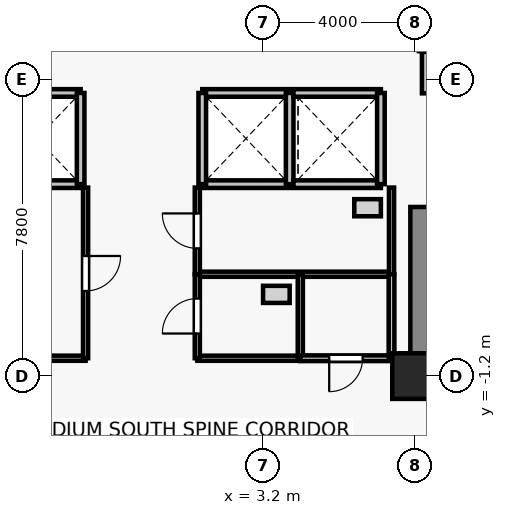
"""IFC4 building model, lengths in metres.
Left out: names, types, materials, properties, quantities, classifications, styles, units other than length and angle.
Written with IfcOpenShell. Run it as: python <this file> out.ifc"""

import sys

from ifc_helpers import new_model, si_unit, direction, frame, frame_2d, origin, origin_2d, place, context, subcontext, project, spatial, rectangle, extrude, source, transform, mapped, element, fill, save


model = new_model("IFC4")
c1 = context("Model", 3, precision=1e-05, world=origin(), true_north=direction((0.0, 1.0)))
c2 = subcontext(c1, "Body", "Model", "MODEL_VIEW")
j1 = project(units=[si_unit("LENGTHUNIT", "METRE"), si_unit("PLANEANGLEUNIT", "RADIAN")], contexts=[c1])
p1 = place(None, origin())
s1 = spatial("IfcSite", under=j1, at=p1, CompositionType="ELEMENT")
p2 = place(p1, origin())
s2 = spatial("IfcBuilding", under=s1, at=p2, CompositionType="ELEMENT")
p3 = place(p2, frame((0.0, 0.0, 13.8)))
s3 = spatial("IfcBuildingStorey", under=s2, at=p3, CompositionType="ELEMENT", Elevation=13.8)
p4 = place(p3, frame((7.2, -1.2, 0.0), z_axis=(0.0, 0.0, 1.0), x_axis=(1.0, 0.0, 0.0)))
e1 = element("IfcColumn", 1, at=p4, inside=s3, PredefinedType="COLUMN", context=c2, shape_type="SweptSolid", body=[
    extrude(rectangle(XDim=1.2, YDim=1.2, at=origin_2d()), origin(), (0.0, 0.0, 1.0), 4.4),
])
p5 = place(p3, frame((7.4, -0.75, 0.0), z_axis=(0.0, 0.0, 1.0), x_axis=(0.0, 1.0, 0.0)))
e2 = element("IfcWall", 2, at=p5, inside=s3, PredefinedType="SHEAR", context=c2, shape_type="SweptSolid", body=[
    extrude(rectangle(XDim=4.0, YDim=0.65, at=frame_2d((2.0, 0.0))), origin(), (0.0, 0.0, 1.0), 4.1),
])
for number, where, z_axis, x_axis in (
    (3, (-1.6, 3.85, 0.0), (0.0, 0.0, 1.0), (-1.0, 0.0, 0.0)),
    (4, (-3.9, 6.25, 0.0), (0.0, 0.0, 1.0), (1.0, 0.0, 0.0)),
):
    element("IfcWall", number, at=place(p3, frame(where, z_axis=z_axis, x_axis=x_axis)), inside=s3, PredefinedType="SOLIDWALL", context=c2, shape_type="SweptSolid", body=[
        extrude(rectangle(XDim=2.3, YDim=0.2, at=frame_2d((1.15, 0.0))), origin(), (0.0, 0.0, 1.0), 4.1),
    ])
p6 = place(p3, frame((-1.6, 6.25, 0.0), z_axis=(0.0, 0.0, 1.0), x_axis=(0.0, -1.0, 0.0)))
e5 = element("IfcWall", 5, at=p6, inside=s3, PredefinedType="SOLIDWALL", context=c2, shape_type="SweptSolid", body=[
    extrude(rectangle(XDim=2.4, YDim=0.2, at=frame_2d((1.2, 0.0))), origin(), (0.0, 0.0, 1.0), 4.1),
])
for number, where, z_axis, x_axis in (
    (6, (3.9, 3.85, 0.0), (0.0, 0.0, 1.0), (-1.0, 0.0, 0.0)),
    (7, (1.6, 6.25, 0.0), (0.0, 0.0, 1.0), (1.0, 0.0, 0.0)),
):
    element("IfcWall", number, at=place(p3, frame(where, z_axis=z_axis, x_axis=x_axis)), inside=s3, PredefinedType="SOLIDWALL", context=c2, shape_type="SweptSolid", body=[
        extrude(rectangle(XDim=2.3, YDim=0.2, at=frame_2d((1.15, 0.0))), origin(), (0.0, 0.0, 1.0), 4.1),
    ])
for number, where, z_axis, x_axis in (
    (8, (1.6, 3.85, 0.0), (0.0, 0.0, 1.0), (0.0, 1.0, 0.0)),
    (9, (3.9, 6.25, 0.0), (0.0, 0.0, 1.0), (0.0, -1.0, 0.0)),
):
    element("IfcWall", number, at=place(p3, frame(where, z_axis=z_axis, x_axis=x_axis)), inside=s3, PredefinedType="SOLIDWALL", context=c2, shape_type="SweptSolid", body=[
        extrude(rectangle(XDim=2.4, YDim=0.2, at=frame_2d((1.2, 0.0))), origin(), (0.0, 0.0, 1.0), 4.1),
    ])
for number, where, z_axis, x_axis in (
    (10, (6.3, 3.85, 0.0), (0.0, 0.0, 1.0), (-1.0, 0.0, 0.0)),
    (11, (4.0, 6.25, 0.0), (0.0, 0.0, 1.0), (1.0, 0.0, 0.0)),
):
    element("IfcWall", number, at=place(p3, frame(where, z_axis=z_axis, x_axis=x_axis)), inside=s3, PredefinedType="SOLIDWALL", context=c2, shape_type="SweptSolid", body=[
        extrude(rectangle(XDim=2.3, YDim=0.2, at=frame_2d((1.15, 0.0))), origin(), (0.0, 0.0, 1.0), 4.1),
    ])
p7 = place(p3, frame((6.3, 6.25, 0.0), z_axis=(0.0, 0.0, 1.0), x_axis=(0.0, -1.0, 0.0)))
e12 = element("IfcWall", 12, at=p7, inside=s3, PredefinedType="SOLIDWALL", context=c2, shape_type="SweptSolid", body=[
    extrude(rectangle(XDim=2.4, YDim=0.2, at=frame_2d((1.2, 0.0))), origin(), (0.0, 0.0, 1.0), 4.1),
])
p8 = place(p3, frame((9.6, 7.35, 0.0), z_axis=(0.0, 0.0, 1.0), x_axis=(-1.0, 0.0, 0.0)))
e13 = element("IfcWall", 13, at=p8, inside=s3, PredefinedType="SOLIDWALL", context=c2, shape_type="SweptSolid", body=[
    extrude(rectangle(XDim=2.2, YDim=0.2, at=frame_2d((1.1, 0.0))), origin(), (0.0, 0.0, 1.0), 3.19),
])
p9 = place(p3, frame((7.47, 6.24, 0.0), z_axis=(0.0, 0.0, 1.0), x_axis=(0.0, 1.0, 0.0)))
e14 = element("IfcWall", 14, at=p9, inside=s3, PredefinedType="PARTITIONING", context=c2, shape_type="SweptSolid", body=[
    extrude(rectangle(XDim=1.09, YDim=0.18, at=frame_2d((0.545, 0.0))), origin(), (0.0, 0.0, 1.0), 3.19),
])
p10 = place(p3, frame((-1.47, -0.73, 0.0), z_axis=(0.0, 0.0, 1.0), x_axis=(-1.0, 0.0, 0.0)))
e15 = element("IfcWall", 15, at=p10, inside=s3, PredefinedType="PARTITIONING", context=c2, shape_type="SweptSolid", body=[
    extrude(rectangle(XDim=5.11, YDim=0.135, at=frame_2d((2.555, 0.0))), origin(), (0.0, 0.0, 1.0), 4.1),
])
p11 = place(p3, frame((-1.47, 3.76, 0.0), z_axis=(0.0, 0.0, 1.0), x_axis=(0.0, -1.0, 0.0)))
e16 = element("IfcWall", 16, at=p11, inside=s3, PredefinedType="PARTITIONING", context=c2, shape_type="SweptSolid", body=[
    extrude(rectangle(XDim=4.49, YDim=0.135, at=frame_2d((2.245, 0.0))), origin(), (0.0, 0.0, 1.0), 3.473),
])
p12 = place(p11, frame((1.8, 0.0, 0.0)))
e17 = element("IfcOpeningElement", 17, at=p12, cuts=e16, PredefinedType="OPENING", context=c2, shape_type="SweptSolid", body=[
    extrude(rectangle(XDim=0.92, YDim=2.1, at=frame_2d((0.46, 1.05))), frame((0.0, 0.077, 0.0), z_axis=(0.0, -1.0, 0.0), x_axis=(1.0, 0.0, 0.0)), (0.0, 0.0, 1.0), 0.155),
])
p13 = place(p3, frame((6.58, 1.48, 0.0), z_axis=(0.0, 0.0, 1.0), x_axis=(-1.0, 0.0, 0.0)))
e18 = element("IfcWall", 18, at=p13, inside=s3, PredefinedType="PARTITIONING", context=c2, shape_type="SweptSolid", body=[
    extrude(rectangle(XDim=5.11, YDim=0.135, at=frame_2d((2.555, 0.0))), origin(), (0.0, 0.0, 1.0), 4.1),
])
p14 = place(p3, frame((1.47, 1.48, 0.0), z_axis=(0.0, 0.0, 1.0), x_axis=(0.0, 1.0, 0.0)))
e19 = element("IfcWall", 19, at=p14, inside=s3, PredefinedType="PARTITIONING", context=c2, shape_type="SweptSolid", body=[
    extrude(rectangle(XDim=2.28, YDim=0.135, at=frame_2d((1.14, 0.0))), origin(), (0.0, 0.0, 1.0), 3.473),
])
p15 = place(p14, frame((0.68, 0.0, 0.0)))
e20 = element("IfcOpeningElement", 20, at=p15, cuts=e19, PredefinedType="OPENING", context=c2, shape_type="SweptSolid", body=[
    extrude(rectangle(XDim=0.92, YDim=2.1, at=frame_2d((0.46, 1.05))), frame((0.0, 0.077, 0.0), z_axis=(0.0, -1.0, 0.0), x_axis=(1.0, 0.0, 0.0)), (0.0, 0.0, 1.0), 0.155),
])
p16 = place(p3, frame((6.58, 3.76, 0.0), z_axis=(0.0, 0.0, 1.0), x_axis=(0.0, -1.0, 0.0)))
e21 = element("IfcWall", 21, at=p16, inside=s3, PredefinedType="PARTITIONING", context=c2, shape_type="SweptSolid", body=[
    extrude(rectangle(XDim=2.28, YDim=0.135, at=frame_2d((1.14, 0.0))), origin(), (0.0, 0.0, 1.0), 3.473),
])
p17 = place(p3, frame((4.18, -0.73, 0.0), z_axis=(0.0, 0.0, 1.0), x_axis=(-1.0, 0.0, 0.0)))
e22 = element("IfcWall", 22, at=p17, inside=s3, PredefinedType="PARTITIONING", context=c2, shape_type="SweptSolid", body=[
    extrude(rectangle(XDim=2.71, YDim=0.135, at=frame_2d((1.355, 0.0))), origin(), (0.0, 0.0, 1.0), 4.1),
])
p18 = place(p3, frame((1.47, -0.73, 0.0), z_axis=(0.0, 0.0, 1.0), x_axis=(0.0, 1.0, 0.0)))
e23 = element("IfcWall", 23, at=p18, inside=s3, PredefinedType="PARTITIONING", context=c2, shape_type="SweptSolid", body=[
    extrude(rectangle(XDim=2.21, YDim=0.135, at=frame_2d((1.105, 0.0))), origin(), (0.0, 0.0, 1.0), 4.1),
])
p19 = place(p18, frame((0.65, 0.0, 0.0)))
e24 = element("IfcOpeningElement", 24, at=p19, cuts=e23, PredefinedType="OPENING", context=c2, shape_type="SweptSolid", body=[
    extrude(rectangle(XDim=0.92, YDim=2.1, at=frame_2d((0.46, 1.05))), frame((0.0, 0.077, 0.0), z_axis=(0.0, -1.0, 0.0), x_axis=(1.0, 0.0, 0.0)), (0.0, 0.0, 1.0), 0.155),
])
p20 = place(p3, frame((4.18, 1.48, 0.0), z_axis=(0.0, 0.0, 1.0), x_axis=(0.0, -1.0, 0.0)))
e25 = element("IfcWall", 25, at=p20, inside=s3, PredefinedType="PARTITIONING", context=c2, shape_type="SweptSolid", body=[
    extrude(rectangle(XDim=2.21, YDim=0.135, at=frame_2d((1.105, 0.0))), origin(), (0.0, 0.0, 1.0), 4.1),
])
p21 = place(p3, frame((6.58, -0.73, 0.0), z_axis=(0.0, 0.0, 1.0), x_axis=(-1.0, 0.0, 0.0)))
e26 = element("IfcWall", 26, at=p21, inside=s3, PredefinedType="PARTITIONING", context=c2, shape_type="SweptSolid", body=[
    extrude(rectangle(XDim=2.4, YDim=0.15, at=frame_2d((1.2, 0.0))), origin(), (0.0, 0.0, 1.0), 4.1),
])
p22 = place(p21, frame((0.76, 0.0, 0.0)))
e27 = element("IfcOpeningElement", 27, at=p22, cuts=e26, PredefinedType="OPENING", context=c2, shape_type="SweptSolid", body=[
    extrude(rectangle(XDim=0.88, YDim=2.1, at=frame_2d((0.44, 1.05))), frame((0.0, 0.085, 0.0), z_axis=(0.0, -1.0, 0.0), x_axis=(1.0, 0.0, 0.0)), (0.0, 0.0, 1.0), 0.17),
])
p23 = place(p3, frame((6.58, 1.48, 0.0), z_axis=(0.0, 0.0, 1.0), x_axis=(0.0, -1.0, 0.0)))
e28 = element("IfcWall", 28, at=p23, inside=s3, PredefinedType="PARTITIONING", context=c2, shape_type="SweptSolid", body=[
    extrude(rectangle(XDim=2.21, YDim=0.15, at=frame_2d((1.105, 0.0))), origin(), (0.0, 0.0, 1.0), 4.1),
])
m1 = source(origin(), c2, "Body", "SweptSolid", [
    extrude(rectangle(XDim=0.92, YDim=2.1, at=frame_2d((0.46, 1.05))), frame((0.0, 0.025, 0.0), z_axis=(0.0, -1.0, 0.0), x_axis=(1.0, 0.0, 0.0)), (0.0, 0.0, 1.0), 0.05),
])
p24 = place(p12, origin())
e29 = element("IfcDoor", 29, at=p24, inside=s3, OperationType="SINGLE_SWING_LEFT", PredefinedType="DOOR", context=c2, shape_type="MappedRepresentation", body=[
    mapped(m1, transform((0.0, 0.0, 0.0), x_axis=(1.0, 0.0, 0.0), y_axis=(0.0, 1.0, 0.0), z_axis=(0.0, 0.0, 1.0), scale=1.0)),
])
fill(e17, e29)
p25 = place(p15, origin())
e30 = element("IfcDoor", 30, at=p25, inside=s3, OperationType="SINGLE_SWING_RIGHT", PredefinedType="DOOR", context=c2, shape_type="MappedRepresentation", body=[
    mapped(m1, transform((0.0, 0.0, 0.0), x_axis=(1.0, 0.0, 0.0), y_axis=(0.0, 1.0, 0.0), z_axis=(0.0, 0.0, 1.0), scale=1.0)),
])
fill(e20, e30)
p26 = place(p19, origin())
e31 = element("IfcDoor", 31, at=p26, inside=s3, OperationType="SINGLE_SWING_LEFT", PredefinedType="DOOR", context=c2, shape_type="MappedRepresentation", body=[
    mapped(m1, transform((0.0, 0.0, 0.0), x_axis=(1.0, 0.0, 0.0), y_axis=(0.0, 1.0, 0.0), z_axis=(0.0, 0.0, 1.0), scale=1.0)),
])
fill(e24, e31)
m2 = source(origin(), c2, "Body", "SweptSolid", [
    extrude(rectangle(XDim=0.88, YDim=2.1, at=frame_2d((0.44, 1.05))), frame((0.0, 0.025, 0.0), z_axis=(0.0, -1.0, 0.0), x_axis=(1.0, 0.0, 0.0)), (0.0, 0.0, 1.0), 0.05),
])
p27 = place(p22, origin())
e32 = element("IfcDoor", 32, at=p27, inside=s3, OperationType="SINGLE_SWING_RIGHT", PredefinedType="DOOR", context=c2, shape_type="MappedRepresentation", body=[
    mapped(m2, transform((0.0, 0.0, 0.0), x_axis=(1.0, 0.0, 0.0), y_axis=(0.0, 1.0, 0.0), z_axis=(0.0, 0.0, 1.0), scale=1.0)),
])
fill(e27, e32)
save(model, sys.argv[1])
